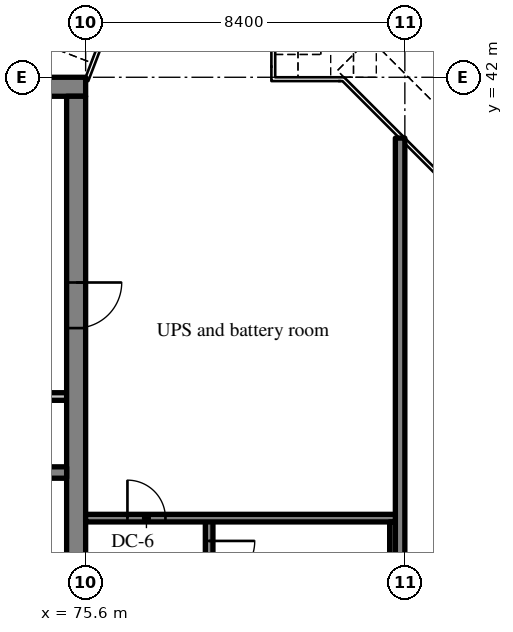
"""IFC4 building model, lengths in metres.
Left out: names, types, materials, properties, quantities, classifications, styles, units other than length and angle.
Written with IfcOpenShell. Run it as: python <this file> out.ifc"""

import sys

from ifc_helpers import new_model, si_unit, direction, frame, frame_2d, origin, place, context, subcontext, project, spatial, rectangle, extrude, source, transform, mapped, element, fill, save


model = new_model("IFC4")
c1 = context("Model", 3, precision=1e-05, world=origin(), true_north=direction((0.0, 1.0)))
c2 = subcontext(c1, "Body", "Model", "MODEL_VIEW")
j1 = project(units=[si_unit("LENGTHUNIT", "METRE"), si_unit("PLANEANGLEUNIT", "RADIAN")], contexts=[c1])
p1 = place(None, origin())
s1 = spatial("IfcSite", under=j1, at=p1, CompositionType="ELEMENT")
p2 = place(p1, origin())
s2 = spatial("IfcBuilding", under=s1, at=p2, CompositionType="ELEMENT")
p3 = place(p2, frame((0.0, 0.0, 317.7)))
s3 = spatial("IfcBuildingStorey", under=s2, at=p3, CompositionType="ELEMENT", Elevation=317.7)
m1 = source(origin(), c2, "Body", "SweptSolid", [
    extrude(rectangle(XDim=50.4, YDim=0.5, at=frame_2d((25.2, 0.0))), origin(), (0.0, 0.0, 1.0), 5.72),
])
p4 = place(p3, frame((25.2, 41.75, 0.0), z_axis=(0.0, 0.0, 1.0), x_axis=(1.0, 0.0, 0.0)))
e1 = element("IfcWall", 1, at=p4, inside=s3, PredefinedType="SHEAR", context=c2, shape_type="MappedRepresentation", body=[
    mapped(m1, transform((0.0, 0.0, 0.0), scale=1.0)),
])
m2 = source(origin(), c2, "Body", "SweptSolid", [
    extrude(rectangle(XDim=19.0, YDim=0.5, at=frame_2d((9.5, 0.0))), origin(), (0.0, 0.0, 1.0), 5.72),
])
p5 = place(p3, frame((75.35, 22.5, 0.0), z_axis=(0.0, 0.0, 1.0), x_axis=(0.0, 1.0, 0.0)))
e2 = element("IfcWall", 2, at=p5, inside=s3, PredefinedType="SHEAR", context=c2, shape_type="MappedRepresentation", body=[
    mapped(m2, transform((0.0, 0.0, 0.0), scale=1.0)),
])
m3 = source(origin(), c2, "Body", "SweptSolid", [
    extrude(rectangle(XDim=1.2, YDim=2.1, at=frame_2d((0.6, 1.05))), frame((0.0, 0.26, 0.0), z_axis=(0.0, -1.0, 0.0), x_axis=(1.0, 0.0, 0.0)), (0.0, 0.0, 1.0), 0.52),
])
p6 = place(p5, frame((12.9, 0.0, 0.0)))
e3 = element("IfcOpeningElement", 3, at=p6, cuts=e2, PredefinedType="OPENING", context=c2, shape_type="MappedRepresentation", body=[
    mapped(m3, transform((0.0, 0.0, 0.0), scale=1.0)),
])
m4 = source(origin(), c2, "Body", "SweptSolid", [
    extrude(rectangle(XDim=7.75, YDim=0.3, at=frame_2d((3.875, 0.0))), origin(), (0.0, 0.0, 1.0), 5.72),
])
p7 = place(p3, frame((67.35, 31.6, 0.0), z_axis=(0.0, 0.0, 1.0), x_axis=(1.0, 0.0, 0.0)))
e4 = element("IfcWall", 4, at=p7, inside=s3, PredefinedType="SHEAR", context=c2, shape_type="MappedRepresentation", body=[
    mapped(m4, transform((0.0, 0.0, 0.0), scale=1.0)),
])
m5 = source(origin(), c2, "Body", "SweptSolid", [
    extrude(rectangle(XDim=1.1, YDim=2.1, at=frame_2d((0.55, 1.05))), frame((0.0, 0.16, 0.0), z_axis=(0.0, -1.0, 0.0), x_axis=(1.0, 0.0, 0.0)), (0.0, 0.0, 1.0), 0.32),
])
p8 = place(p7, frame((5.875, 0.0, 0.0)))
e5 = element("IfcOpeningElement", 5, at=p8, cuts=e4, PredefinedType="OPENING", context=c2, shape_type="MappedRepresentation", body=[
    mapped(m5, transform((0.0, 0.0, 0.0), scale=1.0)),
])
m6 = source(origin(), c2, "Body", "SweptSolid", [
    extrude(rectangle(XDim=18.4, YDim=0.25, at=frame_2d((9.2, 0.0))), origin(), (0.0, 0.0, 1.0), 5.72),
])
p9 = place(p3, frame((83.875, 22.0, 0.0), z_axis=(0.0, 0.0, 1.0), x_axis=(0.0, 1.0, 0.0)))
e6 = element("IfcWall", 6, at=p9, inside=s3, PredefinedType="SHEAR", context=c2, shape_type="MappedRepresentation", body=[
    mapped(m6, transform((0.0, 0.0, 0.0), scale=1.0)),
])
m7 = source(origin(), c2, "Body", "SweptSolid", [
    extrude(rectangle(XDim=2.65, YDim=0.2, at=frame_2d((1.325, 0.0))), origin(), (0.0, 0.0, 1.0), 5.72),
])
p10 = place(p3, frame((72.45, 33.6, 0.0), z_axis=(0.0, 0.0, 1.0), x_axis=(1.0, 0.0, 0.0)))
e7 = element("IfcWall", 7, at=p10, inside=s3, PredefinedType="SOLIDWALL", context=c2, shape_type="MappedRepresentation", body=[
    mapped(m7, transform((0.0, 0.0, 0.0), scale=1.0)),
])
m8 = source(origin(), c2, "Body", "SweptSolid", [
    extrude(rectangle(XDim=8.3, YDim=0.2, at=frame_2d((4.15, 0.0))), origin(), (0.0, 0.0, 1.0), 5.72),
])
p11 = place(p3, frame((78.85, 22.1, 0.0), z_axis=(0.0, 0.0, 1.0), x_axis=(0.0, 1.0, 0.0)))
e8 = element("IfcWall", 8, at=p11, inside=s3, PredefinedType="SOLIDWALL", context=c2, shape_type="MappedRepresentation", body=[
    mapped(m8, transform((0.0, 0.0, 0.0), scale=1.0)),
])
m9 = source(origin(), c2, "Body", "SweptSolid", [
    extrude(rectangle(XDim=1.2, YDim=2.1, at=frame_2d((0.6, 1.05))), frame((0.0, 0.11, 0.0), z_axis=(0.0, -1.0, 0.0), x_axis=(1.0, 0.0, 0.0)), (0.0, 0.0, 1.0), 0.22),
])
p12 = place(p11, frame((6.5, 0.0, 0.0)))
e9 = element("IfcOpeningElement", 9, at=p12, cuts=e8, PredefinedType="OPENING", context=c2, shape_type="MappedRepresentation", body=[
    mapped(m9, transform((0.0, 0.0, 0.0), scale=1.0)),
])
m10 = source(origin(), c2, "Body", "SweptSolid", [
    extrude(rectangle(XDim=8.15, YDim=0.2, at=frame_2d((4.075, 0.0))), origin(), (0.0, 0.0, 1.0), 5.72),
])
p13 = place(p3, frame((83.75, 30.4, 0.0), z_axis=(0.0, 0.0, 1.0), x_axis=(-1.0, 0.0, 0.0)))
e10 = element("IfcWall", 10, at=p13, inside=s3, PredefinedType="SOLIDWALL", context=c2, shape_type="MappedRepresentation", body=[
    mapped(m10, transform((0.0, 0.0, 0.0), scale=1.0)),
])
m11 = source(origin(), c2, "Body", "SweptSolid", [
    extrude(rectangle(XDim=1.0, YDim=2.1, at=frame_2d((0.5, 1.05))), frame((0.0, 0.11, 0.0), z_axis=(0.0, -1.0, 0.0), x_axis=(1.0, 0.0, 0.0)), (0.0, 0.0, 1.0), 0.22),
])
p14 = place(p13, frame((6.05, 0.0, 0.0)))
e11 = element("IfcOpeningElement", 11, at=p14, cuts=e10, PredefinedType="OPENING", context=c2, shape_type="MappedRepresentation", body=[
    mapped(m11, transform((0.0, 0.0, 0.0), scale=1.0)),
])
m12 = source(origin(), c2, "Body", "SweptSolid", [
    extrude(rectangle(XDim=8.1, YDim=0.15, at=frame_2d((4.05, 0.0))), origin(), (0.0, 0.0, 1.0), 5.72),
])
p15 = place(p3, frame((83.675, 22.2, 0.0), z_axis=(0.0, 0.0, 1.0), x_axis=(0.0, 1.0, 0.0)))
e12 = element("IfcWall", 12, at=p15, inside=s3, PredefinedType="SOLIDWALL", context=c2, shape_type="MappedRepresentation", body=[
    mapped(m12, transform((0.0, 0.0, 0.0), scale=1.0)),
])
m13 = source(origin(), c2, "Body", "SweptSolid", [
    extrude(rectangle(XDim=1.2, YDim=2.1, at=frame_2d((0.6, 1.05))), frame((0.0, 0.025, 0.0), z_axis=(0.0, -1.0, 0.0), x_axis=(1.0, 0.0, 0.0)), (0.0, 0.0, 1.0), 0.05),
])
p16 = place(p6, origin())
e13 = element("IfcDoor", 13, at=p16, inside=s3, OperationType="SINGLE_SWING_RIGHT", PredefinedType="DOOR", context=c2, shape_type="MappedRepresentation", body=[
    mapped(m13, transform((0.0, 0.0, 0.0), scale=1.0)),
])
fill(e3, e13)
p17 = place(p12, origin())
e14 = element("IfcDoor", 14, at=p17, inside=s3, OperationType="SINGLE_SWING_RIGHT", PredefinedType="DOOR", context=c2, shape_type="MappedRepresentation", body=[
    mapped(m13, transform((0.0, 0.0, 0.0), scale=1.0)),
])
fill(e9, e14)
m14 = source(origin(), c2, "Body", "SweptSolid", [
    extrude(rectangle(XDim=1.0, YDim=2.1, at=frame_2d((0.5, 1.05))), frame((0.0, 0.025, 0.0), z_axis=(0.0, -1.0, 0.0), x_axis=(1.0, 0.0, 0.0)), (0.0, 0.0, 1.0), 0.05),
])
p18 = place(p14, origin())
e15 = element("IfcDoor", 15, at=p18, inside=s3, OperationType="SINGLE_SWING_RIGHT", PredefinedType="DOOR", context=c2, shape_type="MappedRepresentation", body=[
    mapped(m14, transform((0.0, 0.0, 0.0), scale=1.0)),
])
fill(e11, e15)
save(model, sys.argv[1])
